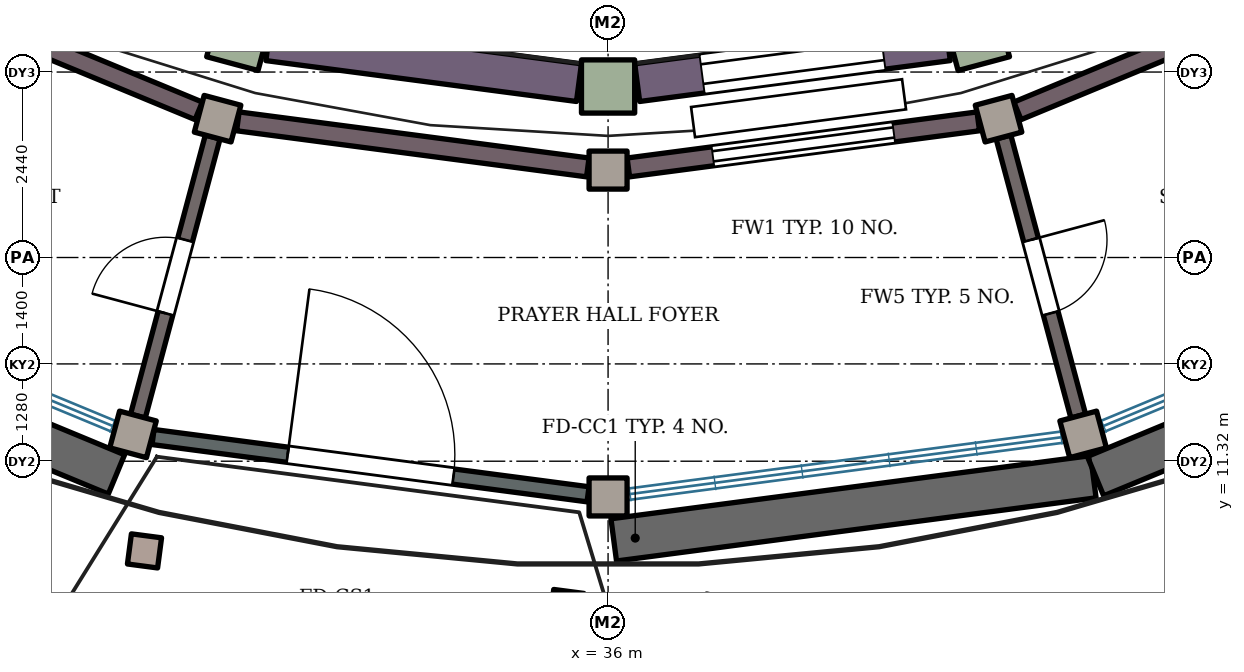
"""IFC4 building model, lengths in metres.
Left out: names, types, materials, properties, quantities, classifications, styles, units other than length and angle.
Written with IfcOpenShell. Run it as: python <this file> out.ifc"""

import sys

from ifc_helpers import new_model, si_unit, direction, frame, frame_2d, origin, origin_2d, place, context, subcontext, project, spatial, rectangle, extrude, element, fill, save


model = new_model("IFC4")
c1 = context("Model", 3, precision=1e-05, world=origin(), true_north=direction((0.0, 1.0)))
c2 = subcontext(c1, "Body", "Model", "MODEL_VIEW")
j1 = project(units=[si_unit("LENGTHUNIT", "METRE"), si_unit("PLANEANGLEUNIT", "RADIAN")], contexts=[c1])
p1 = place(None, origin())
s1 = spatial("IfcSite", under=j1, at=p1, CompositionType="ELEMENT")
p2 = place(p1, origin())
s2 = spatial("IfcBuilding", under=s1, at=p2, CompositionType="ELEMENT")
p3 = place(p2, origin())
s3 = spatial("IfcBuildingStorey", under=s2, at=p3, CompositionType="ELEMENT", Elevation=0.0)
for number, where, z_axis, x_axis in (
    (1, (31.147, 16.889, 0.0), (0.0, 0.0, 1.0), (0.259, 0.966, 0.0)),
    (2, (36.0, 16.25, 0.0), (0.0, 0.0, 1.0), (1.0, 0.0, 0.0)),
    (3, (40.853, 16.889, 0.0), (0.0, 0.0, 1.0), (0.966, 0.259, 0.0)),
):
    element("IfcColumn", number, at=place(p3, frame(where, z_axis=z_axis, x_axis=x_axis)), inside=s3, PredefinedType="COLUMN", context=c2, shape_type="SweptSolid", body=[
        extrude(rectangle(XDim=0.7, YDim=0.7, at=origin_2d()), origin(), (0.0, 0.0, 1.0), 4.2),
    ])
p4 = place(p3, frame((31.53, 16.838, 0.0), z_axis=(0.0, 0.0, 1.0), x_axis=(0.991450464722, -0.130483623501, 0.0)))
e4 = element("IfcWall", 4, at=p4, inside=s3, PredefinedType="SHEAR", context=c2, shape_type="SweptSolid", body=[
    extrude(rectangle(XDim=4.122, YDim=0.5, at=frame_2d((2.061, 0.0))), origin(), (0.0, 0.0, 1.0), 3.4),
])
p5 = place(p3, frame((36.383, 16.301, 0.0), z_axis=(0.0, 0.0, 1.0), x_axis=(0.991450464722, 0.130483623501, 0.0)))
e5 = element("IfcWall", 5, at=p5, inside=s3, PredefinedType="SHEAR", context=c2, shape_type="SweptSolid", body=[
    extrude(rectangle(XDim=4.122, YDim=0.5, at=frame_2d((2.061, 0.0))), origin(), (0.0, 0.0, 1.0), 3.4),
])
p6 = place(p5, frame((0.861, 0.0, 0.0)))
e6 = element("IfcOpeningElement", 6, at=p6, cuts=e5, PredefinedType="OPENING", context=c2, shape_type="SweptSolid", body=[
    extrude(rectangle(XDim=2.4, YDim=3.2, at=frame_2d((1.2, 1.6))), frame((0.0, 0.26, 0.0), z_axis=(0.0, -1.0, 0.0), x_axis=(1.0, 0.0, 0.0)), (0.0, 0.0, 1.0), 0.52),
])
for number, where, z_axis, x_axis in (
    (7, (30.863, 15.826, 0.0), (0.0, 0.0, 1.0), (0.259, 0.966, 0.0)),
    (8, (36.0, 15.15, 0.0), (0.0, 0.0, 1.0), (1.0, 0.0, 0.0)),
    (9, (41.137, 15.826, 0.0), (0.0, 0.0, 1.0), (0.966, 0.259, 0.0)),
    (10, (29.75, 11.673, 0.0), (0.0, 0.0, 1.0), (0.259, 0.966, 0.0)),
    (11, (36.0, 10.85, 0.0), (0.0, 0.0, 1.0), (1.0, 0.0, 0.0)),
    (12, (42.25, 11.673, 0.0), (0.0, 0.0, 1.0), (0.966, 0.259, 0.0)),
):
    element("IfcColumn", number, at=place(p3, frame(where, z_axis=z_axis, x_axis=x_axis)), inside=s3, PredefinedType="COLUMN", context=c2, shape_type="SweptSolid", body=[
        extrude(rectangle(XDim=0.5, YDim=0.5, at=origin_2d()), origin(), (0.0, 0.0, 1.0), 4.2),
    ])
p7 = place(p3, frame((26.324, 17.706, 0.0), z_axis=(0.0, 0.0, 1.0), x_axis=(0.923889955309, -0.382658268537, 0.0)))
e13 = element("IfcWall", 13, at=p7, inside=s3, PredefinedType="SHEAR", context=c2, shape_type="SweptSolid", body=[
    extrude(rectangle(XDim=4.644, YDim=0.25, at=frame_2d((2.322, 0.0))), origin(), (0.0, 0.0, 1.0), 3.6),
])
p8 = place(p3, frame((31.129, 15.791, 0.0), z_axis=(0.0, 0.0, 1.0), x_axis=(0.991442839224, -0.130541551055, 0.0)))
e14 = element("IfcWall", 14, at=p8, inside=s3, PredefinedType="SHEAR", context=c2, shape_type="SweptSolid", body=[
    extrude(rectangle(XDim=4.644, YDim=0.25, at=frame_2d((2.322, 0.0))), origin(), (0.0, 0.0, 1.0), 3.6),
])
p9 = place(p3, frame((36.267, 15.185, 0.0), z_axis=(0.0, 0.0, 1.0), x_axis=(0.991442839224, 0.130541551055, 0.0)))
e15 = element("IfcWall", 15, at=p9, inside=s3, PredefinedType="SHEAR", context=c2, shape_type="SweptSolid", body=[
    extrude(rectangle(XDim=4.644, YDim=0.25, at=frame_2d((2.322, 0.0))), origin(), (0.0, 0.0, 1.0), 3.6),
])
p10 = place(p9, frame((1.122, 0.0, 0.0)))
e16 = element("IfcOpeningElement", 16, at=p10, cuts=e15, PredefinedType="OPENING", context=c2, shape_type="SweptSolid", body=[
    extrude(rectangle(XDim=2.4, YDim=2.6, at=frame_2d((1.2, 1.3))), frame((0.0, 0.135, 0.0), z_axis=(0.0, -1.0, 0.0), x_axis=(1.0, 0.0, 0.0)), (0.0, 0.0, 1.0), 0.27),
])
p11 = place(p3, frame((41.386, 15.929, 0.0), z_axis=(0.0, 0.0, 1.0), x_axis=(0.923889955309, 0.382658268537, 0.0)))
e17 = element("IfcWall", 17, at=p11, inside=s3, PredefinedType="SHEAR", context=c2, shape_type="SweptSolid", body=[
    extrude(rectangle(XDim=4.644, YDim=0.25, at=frame_2d((2.322, 0.0))), origin(), (0.0, 0.0, 1.0), 3.6),
])
for number, where, z_axis, x_axis in (
    (18, (29.901, 10.14, 0.0), (0.0, 0.0, 1.0), (0.991, -0.131, 0.0)),
    (19, (35.457, 9.408, 0.0), (0.0, 0.0, 1.0), (0.991, -0.131, 0.0)),
):
    element("IfcColumn", number, at=place(p3, frame(where, z_axis=z_axis, x_axis=x_axis)), inside=s3, PredefinedType="COLUMN", context=c2, shape_type="SweptSolid", body=[
        extrude(rectangle(XDim=0.4, YDim=0.4, at=origin_2d()), origin(), (0.0, 0.0, 1.0), 3.3),
    ])
p12 = place(p3, frame((30.013, 11.638, 0.0), z_axis=(0.0, 0.0, 1.0), x_axis=(0.991446664625, -0.130512494435, 0.0)))
e20 = element("IfcWall", 20, at=p12, inside=s3, PredefinedType="STANDARD", context=c2, shape_type="SweptSolid", body=[
    extrude(rectangle(XDim=5.773, YDim=0.2, at=frame_2d((2.886, 0.0))), origin(), (0.0, 0.0, 1.0), 3.5),
])
p13 = place(p12, frame((1.786, 0.0, 0.0)))
e21 = element("IfcOpeningElement", 21, at=p13, cuts=e20, PredefinedType="OPENING", context=c2, shape_type="SweptSolid", body=[
    extrude(rectangle(XDim=2.2, YDim=2.4, at=frame_2d((1.1, 1.2))), frame((0.0, 0.11, 0.0), z_axis=(0.0, -1.0, 0.0), x_axis=(1.0, 0.0, 0.0)), (0.0, 0.0, 1.0), 0.22),
])
p14 = place(p3, frame((23.651, 13.582, 0.0), z_axis=(0.0, 0.0, 1.0), x_axis=(0.923884057426, -0.382672508071, 0.0)))
e22 = element("IfcWall", 22, at=p14, inside=s3, PredefinedType="STANDARD", context=c2, shape_type="SweptSolid", body=[
    extrude(rectangle(XDim=6.365, YDim=0.56, at=frame_2d((3.182, 0.0))), origin(), (0.0, 0.0, 1.0), 0.3),
])
p15 = place(p3, frame((36.074, 10.285, 0.0), z_axis=(0.0, 0.0, 1.0), x_axis=(0.991447635211, 0.130505121106, 0.0)))
e23 = element("IfcWall", 23, at=p15, inside=s3, PredefinedType="STANDARD", context=c2, shape_type="SweptSolid", body=[
    extrude(rectangle(XDim=6.364, YDim=0.56, at=frame_2d((3.182, 0.0))), origin(), (0.0, 0.0, 1.0), 0.3),
])
p16 = place(p3, frame((42.413, 11.123, 0.0), z_axis=(0.0, 0.0, 1.0), x_axis=(0.923884370922, 0.3826717512, 0.0)))
e24 = element("IfcWall", 24, at=p16, inside=s3, PredefinedType="STANDARD", context=c2, shape_type="SweptSolid", body=[
    extrude(rectangle(XDim=6.425, YDim=0.56, at=frame_2d((3.212, 0.0))), origin(), (0.0, 0.0, 1.0), 0.3),
])
p17 = place(p3, frame((30.798, 15.585, 0.0), z_axis=(0.0, 0.0, 1.0), x_axis=(-0.258842055948, -0.965919660258, 0.0)))
e25 = element("IfcWall", 25, at=p17, inside=s3, PredefinedType="PARTITIONING", context=c2, shape_type="SweptSolid", body=[
    extrude(rectangle(XDim=3.8, YDim=0.2, at=frame_2d((1.9, 0.0))), origin(), (0.0, 0.0, 1.0), 4.0),
])
p18 = place(p17, frame((1.4, 0.0, 0.0)))
e26 = element("IfcOpeningElement", 26, at=p18, cuts=e25, PredefinedType="OPENING", context=c2, shape_type="SweptSolid", body=[
    extrude(rectangle(XDim=1.0, YDim=2.1, at=frame_2d((0.5, 1.05))), frame((0.0, 0.11, 0.0), z_axis=(0.0, -1.0, 0.0), x_axis=(1.0, 0.0, 0.0)), (0.0, 0.0, 1.0), 0.22),
])
p19 = place(p3, frame((41.202, 15.585, 0.0), z_axis=(0.0, 0.0, 1.0), x_axis=(0.258842055948, -0.965919660258, 0.0)))
e27 = element("IfcWall", 27, at=p19, inside=s3, PredefinedType="PARTITIONING", context=c2, shape_type="SweptSolid", body=[
    extrude(rectangle(XDim=3.8, YDim=0.2, at=frame_2d((1.9, 0.0))), origin(), (0.0, 0.0, 1.0), 4.0),
])
p20 = place(p19, frame((1.4, 0.0, 0.0)))
e28 = element("IfcOpeningElement", 28, at=p20, cuts=e27, PredefinedType="OPENING", context=c2, shape_type="SweptSolid", body=[
    extrude(rectangle(XDim=1.0, YDim=2.1, at=frame_2d((0.5, 1.05))), frame((0.0, 0.11, 0.0), z_axis=(0.0, -1.0, 0.0), x_axis=(1.0, 0.0, 0.0)), (0.0, 0.0, 1.0), 0.22),
])
p21 = place(p6, origin())
e29 = element("IfcDoor", 29, at=p21, inside=s3, OperationType="DOUBLE_DOOR_SLIDING", PredefinedType="DOOR", context=c2, shape_type="SweptSolid", body=[
    extrude(rectangle(XDim=2.4, YDim=3.2, at=frame_2d((1.2, 1.6))), frame((0.0, 0.025, 0.0), z_axis=(0.0, -1.0, 0.0), x_axis=(1.0, 0.0, 0.0)), (0.0, 0.0, 1.0), 0.05),
])
fill(e6, e29)
p22 = place(p13, origin())
e30 = element("IfcDoor", 30, at=p22, inside=s3, OperationType="DOUBLE_DOOR_DOUBLE_SWING", PredefinedType="DOOR", context=c2, shape_type="SweptSolid", body=[
    extrude(rectangle(XDim=2.2, YDim=2.4, at=frame_2d((1.1, 1.2))), frame((0.0, 0.025, 0.0), z_axis=(0.0, -1.0, 0.0), x_axis=(1.0, 0.0, 0.0)), (0.0, 0.0, 1.0), 0.05),
])
fill(e21, e30)
p23 = place(p10, origin())
e31 = element("IfcDoor", 31, at=p23, inside=s3, OperationType="DOUBLE_DOOR_SLIDING", PredefinedType="DOOR", context=c2, shape_type="SweptSolid", body=[
    extrude(rectangle(XDim=2.4, YDim=2.6, at=frame_2d((1.2, 1.3))), frame((0.0, 0.025, 0.0), z_axis=(0.0, -1.0, 0.0), x_axis=(1.0, 0.0, 0.0)), (0.0, 0.0, 1.0), 0.05),
])
fill(e16, e31)
p24 = place(p18, origin())
e32 = element("IfcDoor", 32, at=p24, inside=s3, OperationType="SINGLE_SWING_RIGHT", PredefinedType="DOOR", context=c2, shape_type="SweptSolid", body=[
    extrude(rectangle(XDim=1.0, YDim=2.1, at=frame_2d((0.5, 1.05))), frame((0.0, 0.025, 0.0), z_axis=(0.0, -1.0, 0.0), x_axis=(1.0, 0.0, 0.0)), (0.0, 0.0, 1.0), 0.05),
])
fill(e26, e32)
p25 = place(p20, origin())
e33 = element("IfcDoor", 33, at=p25, inside=s3, OperationType="SINGLE_SWING_LEFT", PredefinedType="DOOR", context=c2, shape_type="SweptSolid", body=[
    extrude(rectangle(XDim=1.0, YDim=2.1, at=frame_2d((0.5, 1.05))), frame((0.0, 0.025, 0.0), z_axis=(0.0, -1.0, 0.0), x_axis=(1.0, 0.0, 0.0)), (0.0, 0.0, 1.0), 0.05),
])
fill(e28, e33)
save(model, sys.argv[1])
